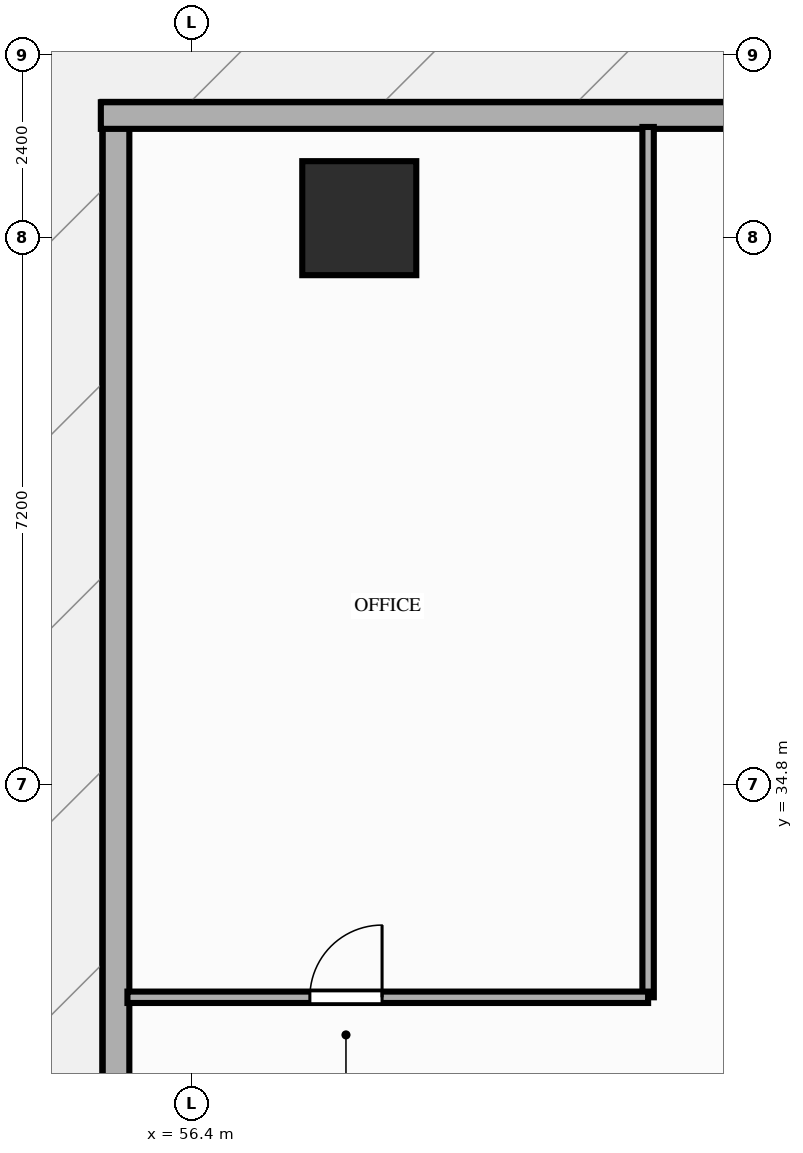
"""IFC4 building model, lengths in metres.
Left out: names, types, materials, properties, quantities, classifications, styles, units other than length and angle.
Written with IfcOpenShell. Run it as: python <this file> out.ifc"""

import sys

from ifc_helpers import new_model, si_unit, direction, frame, frame_2d, origin, origin_2d, place, context, subcontext, project, spatial, rectangle, extrude, element, fill, save


model = new_model("IFC4")
c1 = context("Model", 3, precision=1e-05, world=origin(), true_north=direction((0.0, 1.0)))
c2 = subcontext(c1, "Body", "Model", "MODEL_VIEW")
j1 = project(units=[si_unit("LENGTHUNIT", "METRE"), si_unit("PLANEANGLEUNIT", "RADIAN")], contexts=[c1])
p1 = place(None, origin())
s1 = spatial("IfcSite", under=j1, at=p1, CompositionType="ELEMENT")
p2 = place(p1, origin())
s2 = spatial("IfcBuilding", under=s1, at=p2, CompositionType="ELEMENT")
p3 = place(p2, frame((0.0, 0.0, 21.8)))
s3 = spatial("IfcBuildingStorey", under=s2, at=p3, CompositionType="ELEMENT", Elevation=21.8)
p4 = place(p3, frame((58.6, 42.25, 0.0), z_axis=(0.0, 0.0, 1.0), x_axis=(1.0, 0.0, 0.0)))
e1 = element("IfcColumn", 1, at=p4, inside=s3, PredefinedType="COLUMN", context=c2, shape_type="SweptSolid", body=[
    extrude(rectangle(XDim=1.5, YDim=1.5, at=origin_2d()), origin(), (0.0, 0.0, 1.0), 4.05),
])
p5 = place(p3, frame((55.4, 43.55, 0.0), z_axis=(0.0, 0.0, 1.0), x_axis=(0.0, -1.0, 0.0)))
e2 = element("IfcWall", 2, at=p5, inside=s3, PredefinedType="STANDARD", context=c2, shape_type="SweptSolid", body=[
    extrude(rectangle(XDim=36.1, YDim=0.35, at=frame_2d((18.05, 0.0))), origin(), (0.0, 0.0, 1.0), 4.36),
])
p6 = place(p5, frame((12.6, 0.0, 0.0)))
e3 = element("IfcOpeningElement", 3, at=p6, cuts=e2, PredefinedType="OPENING", context=c2, shape_type="SweptSolid", body=[
    extrude(rectangle(XDim=1.6, YDim=2.15, at=frame_2d((0.8, 1.075))), frame((0.0, 0.185, 0.0), z_axis=(0.0, -1.0, 0.0), x_axis=(1.0, 0.0, 0.0)), (0.0, 0.0, 1.0), 0.37),
])
p7 = place(p3, frame((73.2, 43.6, 0.0), z_axis=(0.0, 0.0, 1.0), x_axis=(-1.0, 0.0, 0.0)))
e4 = element("IfcWall", 4, at=p7, inside=s3, PredefinedType="STANDARD", context=c2, shape_type="SweptSolid", body=[
    extrude(rectangle(XDim=18.0, YDim=0.35, at=frame_2d((9.0, 0.0))), origin(), (0.0, 0.0, 1.0), 4.36),
])
p8 = place(p3, frame((62.4, 32.0, 0.0), z_axis=(0.0, 0.0, 1.0), x_axis=(0.0, 1.0, 0.0)))
e5 = element("IfcWall", 5, at=p8, inside=s3, PredefinedType="PARTITIONING", context=c2, shape_type="SweptSolid", body=[
    extrude(rectangle(XDim=11.45, YDim=0.15, at=frame_2d((5.725, 0.0))), origin(), (0.0, 0.0, 1.0), 3.84),
])
p9 = place(p3, frame((55.55, 32.0, 0.0), z_axis=(0.0, 0.0, 1.0), x_axis=(1.0, 0.0, 0.0)))
e6 = element("IfcWall", 6, at=p9, inside=s3, PredefinedType="PARTITIONING", context=c2, shape_type="SweptSolid", body=[
    extrude(rectangle(XDim=6.85, YDim=0.15, at=frame_2d((3.425, 0.0))), origin(), (0.0, 0.0, 1.0), 2.34),
])
p10 = place(p9, frame((2.4, 0.0, 0.0)))
e7 = element("IfcOpeningElement", 7, at=p10, cuts=e6, PredefinedType="OPENING", context=c2, shape_type="SweptSolid", body=[
    extrude(rectangle(XDim=0.95, YDim=2.15, at=frame_2d((0.475, 1.075))), frame((0.0, 0.085, 0.0), z_axis=(0.0, -1.0, 0.0), x_axis=(1.0, 0.0, 0.0)), (0.0, 0.0, 1.0), 0.17),
])
p11 = place(p10, origin())
e8 = element("IfcDoor", 8, at=p11, inside=s3, OperationType="SINGLE_SWING_RIGHT", PredefinedType="DOOR", context=c2, shape_type="SweptSolid", body=[
    extrude(rectangle(XDim=0.95, YDim=2.15, at=frame_2d((0.475, 1.075))), frame((0.0, 0.025, 0.0), z_axis=(0.0, -1.0, 0.0), x_axis=(1.0, 0.0, 0.0)), (0.0, 0.0, 1.0), 0.05),
])
fill(e7, e8)
save(model, sys.argv[1])
